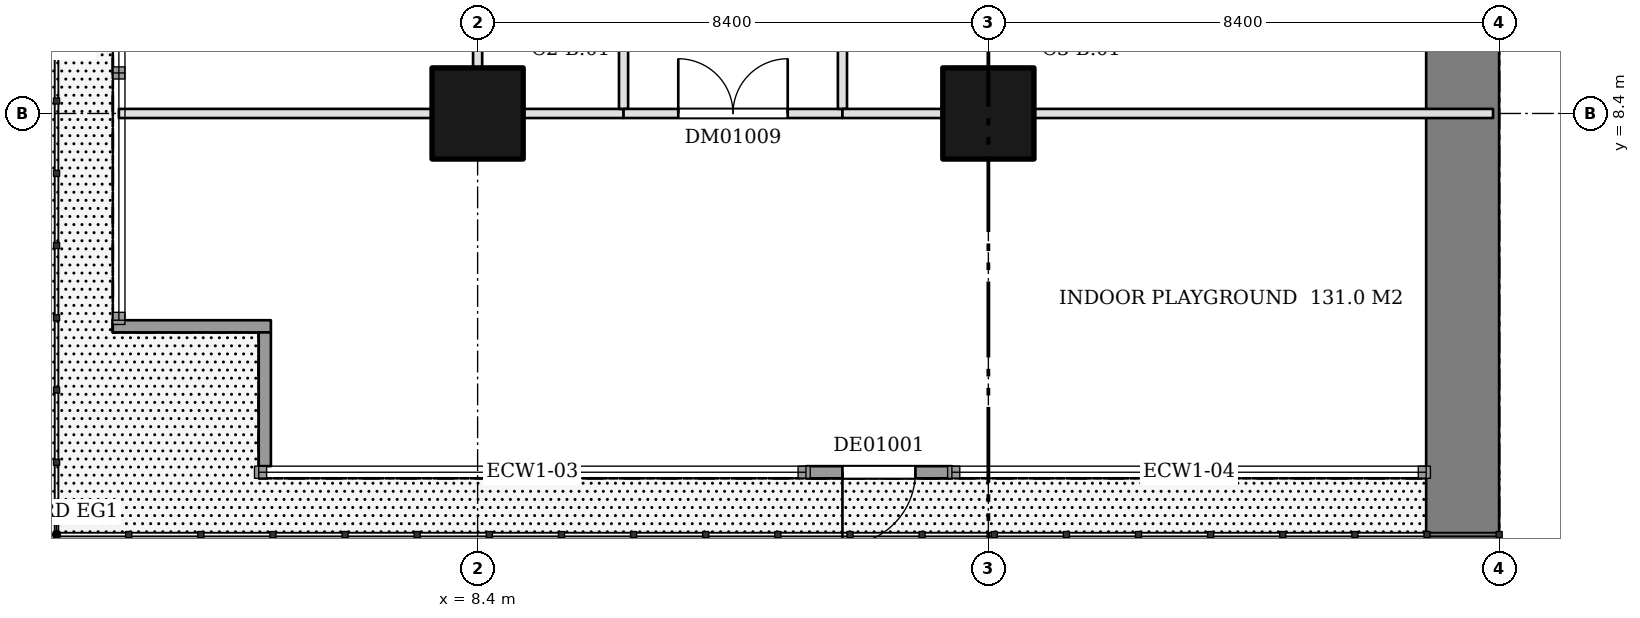
"""IFC4 building model, lengths in metres.
Left out: names, types, materials, properties, quantities, classifications, styles, units other than length and angle.
Written with IfcOpenShell. Run it as: python <this file> out.ifc"""

import sys

from ifc_helpers import new_model, si_unit, direction, frame, frame_2d, origin, origin_2d, place, context, subcontext, project, spatial, rectangle, extrude, element, fill, save


model = new_model("IFC4")
c1 = context("Model", 3, precision=1e-05, world=origin(), true_north=direction((0.0, 1.0)))
c2 = subcontext(c1, "Body", "Model", "MODEL_VIEW")
j1 = project(units=[si_unit("LENGTHUNIT", "METRE"), si_unit("PLANEANGLEUNIT", "RADIAN")], contexts=[c1])
p1 = place(None, origin())
s1 = spatial("IfcSite", under=j1, at=p1, CompositionType="ELEMENT")
p2 = place(p1, origin())
s2 = spatial("IfcBuilding", under=s1, at=p2, CompositionType="ELEMENT")
p3 = place(p2, frame((0.0, 0.0, 9.0)))
s3 = spatial("IfcBuildingStorey", under=s2, at=p3, CompositionType="ELEMENT", Elevation=9.0)
for number, where, z_axis, x_axis in (
    (1, (8.4, 8.4, 0.0), (0.0, 0.0, 1.0), (1.0, 0.0, 0.0)),
    (2, (16.8, 8.4, 0.0), (0.0, 0.0, 1.0), (1.0, 0.0, 0.0)),
):
    element("IfcColumn", number, at=place(p3, frame(where, z_axis=z_axis, x_axis=x_axis)), inside=s3, PredefinedType="COLUMN", context=c2, shape_type="SweptSolid", body=[
        extrude(rectangle(XDim=1.5, YDim=1.5, at=origin_2d()), origin(), (0.0, 0.0, 1.0), 4.95),
    ])
p4 = place(p3, frame((24.6, 0.0, 0.0), z_axis=(0.0, 0.0, 1.0), x_axis=(0.0, 1.0, 0.0)))
e3 = element("IfcWall", 3, at=p4, inside=s3, PredefinedType="SHEAR", context=c2, shape_type="SweptSolid", body=[
    extrude(rectangle(XDim=25.2, YDim=1.2, at=frame_2d((12.6, 0.0))), origin(), (0.0, 0.0, 1.0), 4.95),
])
p5 = place(p3, frame((2.5, 8.4, 0.0), z_axis=(0.0, 0.0, 1.0), x_axis=(1.0, 0.0, 0.0)))
e4 = element("IfcWall", 4, at=p5, inside=s3, PredefinedType="PARTITIONING", context=c2, shape_type="SweptSolid", body=[
    extrude(rectangle(XDim=5.15, YDim=0.15, at=frame_2d((2.575, 0.0))), origin(), (0.0, 0.0, 1.0), 4.95),
])
p6 = place(p3, frame((8.4, 9.15, 0.0), z_axis=(0.0, 0.0, 1.0), x_axis=(0.0, 1.0, 0.0)))
e5 = element("IfcWall", 5, at=p6, inside=s3, PredefinedType="PARTITIONING", context=c2, shape_type="SweptSolid", body=[
    extrude(rectangle(XDim=6.9, YDim=0.15, at=frame_2d((3.45, 0.0))), origin(), (0.0, 0.0, 1.0), 4.95),
])
p7 = place(p6, frame((2.95, 0.0, 0.0)))
e6 = element("IfcOpeningElement", 6, at=p7, cuts=e5, PredefinedType="OPENING", context=c2, shape_type="SweptSolid", body=[
    extrude(rectangle(XDim=1.0, YDim=2.1, at=frame_2d((0.5, 1.05))), frame((0.0, 0.085, 0.0), z_axis=(0.0, -1.0, 0.0), x_axis=(1.0, 0.0, 0.0)), (0.0, 0.0, 1.0), 0.17),
])
p8 = place(p3, frame((9.15, 8.4, 0.0), z_axis=(0.0, 0.0, 1.0), x_axis=(1.0, 0.0, 0.0)))
e7 = element("IfcWall", 7, at=p8, inside=s3, PredefinedType="PARTITIONING", context=c2, shape_type="SweptSolid", body=[
    extrude(rectangle(XDim=1.65, YDim=0.15, at=frame_2d((0.825, 0.0))), origin(), (0.0, 0.0, 1.0), 4.95),
])
p9 = place(p3, frame((10.8, 8.475, 0.0), z_axis=(0.0, 0.0, 1.0), x_axis=(0.0, 1.0, 0.0)))
e8 = element("IfcWall", 8, at=p9, inside=s3, PredefinedType="PARTITIONING", context=c2, shape_type="SweptSolid", body=[
    extrude(rectangle(XDim=18.05, YDim=0.15, at=frame_2d((9.025, 0.0))), origin(), (0.0, 0.0, 1.0), 4.95),
])
p10 = place(p9, frame((8.525, 0.0, 0.0)))
e9 = element("IfcOpeningElement", 9, at=p10, cuts=e8, PredefinedType="OPENING", context=c2, shape_type="SweptSolid", body=[
    extrude(rectangle(XDim=1.0, YDim=2.1, at=frame_2d((0.5, 1.05))), frame((0.0, 0.085, 0.0), z_axis=(0.0, -1.0, 0.0), x_axis=(1.0, 0.0, 0.0)), (0.0, 0.0, 1.0), 0.17),
])
p11 = place(p3, frame((10.8, 8.4, 0.0), z_axis=(0.0, 0.0, 1.0), x_axis=(1.0, 0.0, 0.0)))
e10 = element("IfcWall", 10, at=p11, inside=s3, PredefinedType="PARTITIONING", context=c2, shape_type="SweptSolid", body=[
    extrude(rectangle(XDim=3.6, YDim=0.15, at=frame_2d((1.8, 0.0))), origin(), (0.0, 0.0, 1.0), 4.95),
])
p12 = place(p11, frame((0.9, 0.0, 0.0)))
e11 = element("IfcOpeningElement", 11, at=p12, cuts=e10, PredefinedType="OPENING", context=c2, shape_type="SweptSolid", body=[
    extrude(rectangle(XDim=1.8, YDim=2.1, at=frame_2d((0.9, 1.05))), frame((0.0, 0.085, 0.0), z_axis=(0.0, -1.0, 0.0), x_axis=(1.0, 0.0, 0.0)), (0.0, 0.0, 1.0), 0.17),
])
p13 = place(p3, frame((14.4, 8.475, 0.0), z_axis=(0.0, 0.0, 1.0), x_axis=(0.0, 1.0, 0.0)))
e12 = element("IfcWall", 12, at=p13, inside=s3, PredefinedType="PARTITIONING", context=c2, shape_type="SweptSolid", body=[
    extrude(rectangle(XDim=5.125, YDim=0.15, at=frame_2d((2.562, 0.0))), origin(), (0.0, 0.0, 1.0), 4.95),
])
p14 = place(p13, frame((2.062, 0.0, 0.0)))
e13 = element("IfcOpeningElement", 13, at=p14, cuts=e12, PredefinedType="OPENING", context=c2, shape_type="SweptSolid", body=[
    extrude(rectangle(XDim=1.0, YDim=2.1, at=frame_2d((0.5, 1.05))), frame((0.0, 0.085, 0.0), z_axis=(0.0, -1.0, 0.0), x_axis=(1.0, 0.0, 0.0)), (0.0, 0.0, 1.0), 0.17),
])
p15 = place(p3, frame((14.4, 8.4, 0.0), z_axis=(0.0, 0.0, 1.0), x_axis=(1.0, 0.0, 0.0)))
e14 = element("IfcWall", 14, at=p15, inside=s3, PredefinedType="PARTITIONING", context=c2, shape_type="SweptSolid", body=[
    extrude(rectangle(XDim=1.65, YDim=0.15, at=frame_2d((0.825, 0.0))), origin(), (0.0, 0.0, 1.0), 4.95),
])
p16 = place(p3, frame((17.55, 8.4, 0.0), z_axis=(0.0, 0.0, 1.0), x_axis=(1.0, 0.0, 0.0)))
e15 = element("IfcWall", 15, at=p16, inside=s3, PredefinedType="PARTITIONING", context=c2, shape_type="SweptSolid", body=[
    extrude(rectangle(XDim=7.55, YDim=0.15, at=frame_2d((3.775, 0.0))), origin(), (0.0, 0.0, 1.0), 4.95),
])
p17 = place(p3, frame((2.4, 4.9, 0.0), z_axis=(0.0, 0.0, 1.0), x_axis=(1.0, 0.0, 0.0)))
e16 = element("IfcWall", 16, at=p17, inside=s3, PredefinedType="SOLIDWALL", context=c2, shape_type="SweptSolid", body=[
    extrude(rectangle(XDim=2.6, YDim=0.2, at=frame_2d((1.3, 0.0))), origin(), (0.0, 0.0, 1.0), 4.95),
])
p18 = place(p3, frame((4.9, 4.8, 0.0), z_axis=(0.0, 0.0, 1.0), x_axis=(0.0, -1.0, 0.0)))
e17 = element("IfcWall", 17, at=p18, inside=s3, PredefinedType="SOLIDWALL", context=c2, shape_type="SweptSolid", body=[
    extrude(rectangle(XDim=2.2, YDim=0.2, at=frame_2d((1.1, 0.0))), origin(), (0.0, 0.0, 1.0), 4.95),
])
p19 = place(p3, frame((13.8, 2.5, 0.0), z_axis=(0.0, 0.0, 1.0), x_axis=(1.0, 0.0, 0.0)))
e18 = element("IfcWall", 18, at=p19, inside=s3, PredefinedType="SOLIDWALL", context=c2, shape_type="SweptSolid", body=[
    extrude(rectangle(XDim=2.4, YDim=0.2, at=frame_2d((1.2, 0.0))), origin(), (0.0, 0.0, 1.0), 4.95),
])
p20 = place(p19, frame((0.6, 0.0, 0.0)))
e19 = element("IfcOpeningElement", 19, at=p20, cuts=e18, PredefinedType="OPENING", context=c2, shape_type="SweptSolid", body=[
    extrude(rectangle(XDim=1.2, YDim=2.4, at=frame_2d((0.6, 1.2))), frame((0.0, 0.11, 0.0), z_axis=(0.0, -1.0, 0.0), x_axis=(1.0, 0.0, 0.0)), (0.0, 0.0, 1.0), 0.22),
])
p21 = place(p12, origin())
e20 = element("IfcDoor", 20, at=p21, inside=s3, OperationType="DOUBLE_DOOR_SINGLE_SWING", PredefinedType="DOOR", context=c2, shape_type="SweptSolid", body=[
    extrude(rectangle(XDim=1.8, YDim=2.1, at=frame_2d((0.9, 1.05))), frame((0.0, 0.025, 0.0), z_axis=(0.0, -1.0, 0.0), x_axis=(1.0, 0.0, 0.0)), (0.0, 0.0, 1.0), 0.05),
])
fill(e11, e20)
p22 = place(p20, frame((1.2, 0.0, 0.0), z_axis=(0.0, 0.0, 1.0), x_axis=(-1.0, 0.0, 0.0)))
e21 = element("IfcDoor", 21, at=p22, inside=s3, OperationType="SINGLE_SWING_RIGHT", PredefinedType="DOOR", context=c2, shape_type="SweptSolid", body=[
    extrude(rectangle(XDim=1.2, YDim=2.4, at=frame_2d((0.6, 1.2))), frame((0.0, 0.025, 0.0), z_axis=(0.0, -1.0, 0.0), x_axis=(1.0, 0.0, 0.0)), (0.0, 0.0, 1.0), 0.05),
])
fill(e19, e21)
save(model, sys.argv[1])
